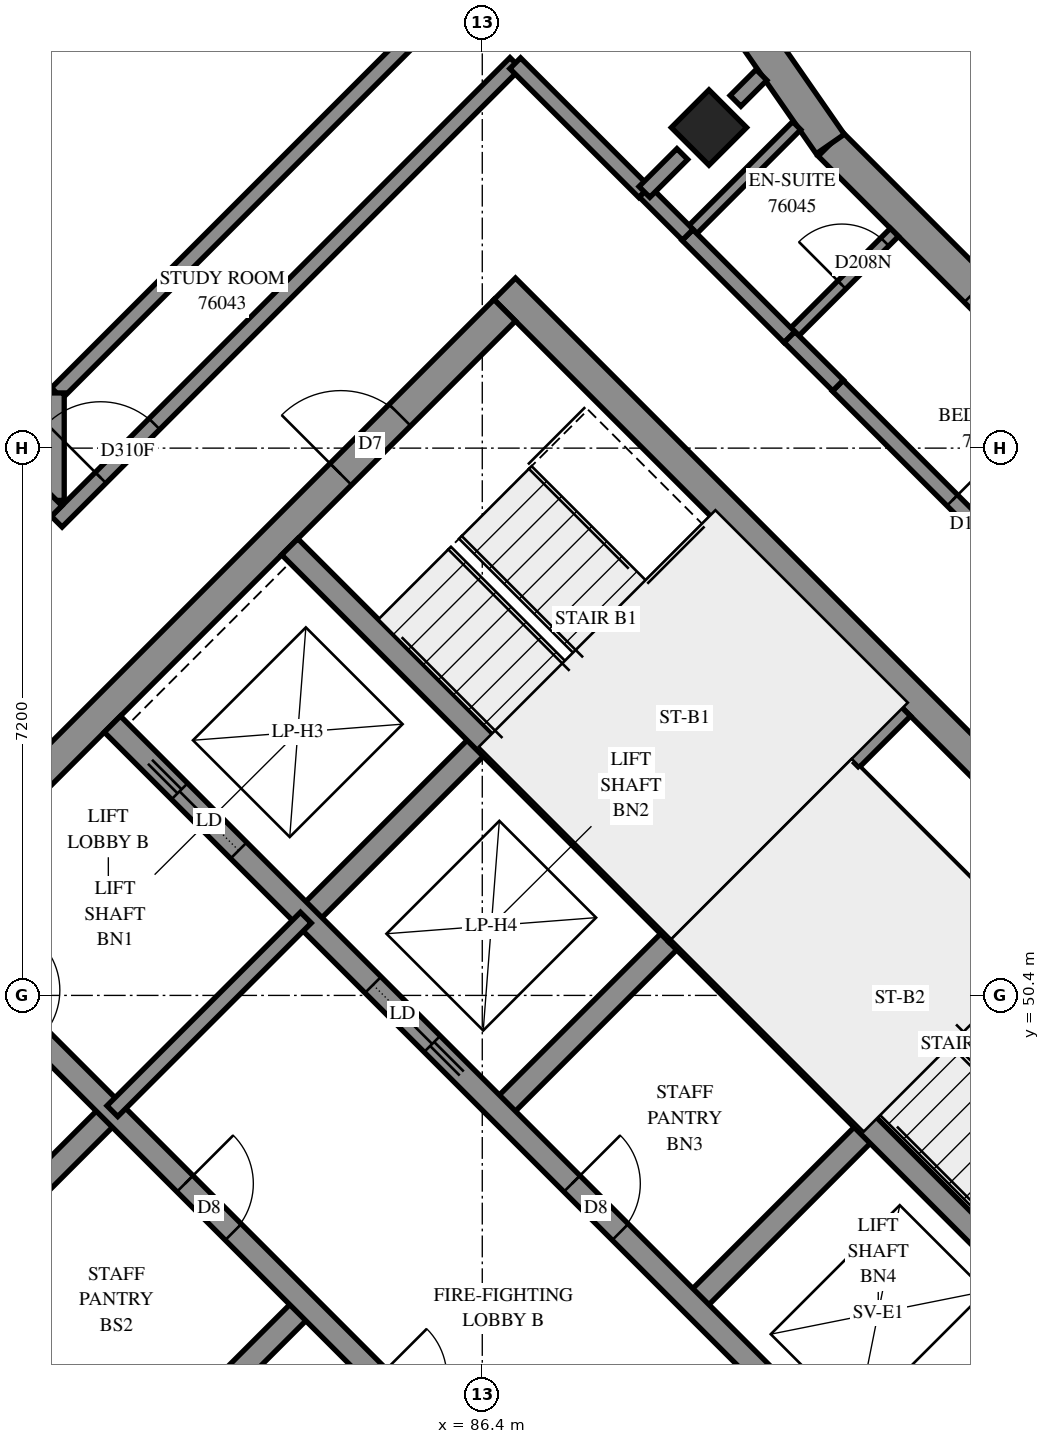
"""IFC4 building model, lengths in metres.
Left out: names, types, materials, properties, quantities, classifications, styles, units other than length and angle.
Written with IfcOpenShell. Run it as: python <this file> out.ifc"""

import sys

from ifc_helpers import new_model, si_unit, direction, frame, frame_2d, origin, origin_2d, place, context, subcontext, project, spatial, polyline, rectangle, outline, extrude, element, fill, save


model = new_model("IFC4")
c1 = context("Model", 3, precision=1e-05, world=origin(), true_north=direction((0.0, 1.0)))
c2 = subcontext(c1, "Body", "Model", "MODEL_VIEW")
j1 = project(units=[si_unit("LENGTHUNIT", "METRE"), si_unit("PLANEANGLEUNIT", "RADIAN")], contexts=[c1])
p1 = place(None, origin())
s1 = spatial("IfcSite", under=j1, at=p1, CompositionType="ELEMENT")
p2 = place(p1, origin())
s2 = spatial("IfcBuilding", under=s1, at=p2, CompositionType="ELEMENT")
p3 = place(p2, frame((0.0, 0.0, 277.8)))
s3 = spatial("IfcBuildingStorey", under=s2, at=p3, CompositionType="ELEMENT", Elevation=277.8)
p4 = place(p3, frame((89.382, 61.818, 0.0), z_axis=(0.0, 0.0, 1.0), x_axis=(0.7071067812, -0.7071067812, 0.0)))
e1 = element("IfcColumn", 1, at=p4, inside=s3, PredefinedType="COLUMN", context=c2, shape_type="SweptSolid", body=[
    extrude(rectangle(XDim=0.7, YDim=0.7, at=origin_2d()), origin(), (0.0, 0.0, 1.0), 3.1),
])
p5 = place(p3, frame((76.23, 49.231, -0.3), z_axis=(0.0, 0.0, 1.0), x_axis=(0.7071034917, -0.7071100706, 0.0)))
e2 = element("IfcWall", 2, at=p5, inside=s3, PredefinedType="SHEAR", context=c2, shape_type="SweptSolid", body=[
    extrude(rectangle(XDim=15.2, YDim=0.4, at=frame_2d((7.6, 0.0))), origin(), (0.0, 0.0, 1.0), 2.7),
])
p6 = place(p3, frame((86.695, 59.696, -0.3), z_axis=(0.0, 0.0, 1.0), x_axis=(0.7071100706, -0.7071034917, 0.0)))
e3 = element("IfcWall", 3, at=p6, inside=s3, PredefinedType="SHEAR", context=c2, shape_type="SweptSolid", body=[
    extrude(rectangle(XDim=15.2, YDim=0.4, at=frame_2d((7.6, 0.0))), origin(), (0.0, 0.0, 1.0), 2.7),
])
p7 = place(p6, frame((10.4, 0.0, 0.3)))
e4 = element("IfcOpeningElement", 4, at=p7, cuts=e3, PredefinedType="OPENING", context=c2, shape_type="SweptSolid", body=[
    extrude(rectangle(XDim=0.8, YDim=2.1, at=frame_2d((0.4, 1.05))), frame((0.0, 0.21, 0.0), z_axis=(0.0, -1.0, 0.0), x_axis=(1.0, 0.0, 0.0)), (0.0, 0.0, 1.0), 0.42),
])
p8 = place(p3, frame((76.513, 49.231, -0.3), z_axis=(0.0, 0.0, 1.0), x_axis=(0.7071067812, 0.7071067812, 0.0)))
e5 = element("IfcWall", 5, at=p8, inside=s3, PredefinedType="SHEAR", context=c2, shape_type="SweptSolid", body=[
    extrude(rectangle(XDim=14.4, YDim=0.4, at=frame_2d((7.2, 0.0))), origin(), (0.0, 0.0, 1.0), 2.7),
])
p9 = place(p8, frame((4.55, 0.0, 0.3)))
e6 = element("IfcOpeningElement", 6, at=p9, cuts=e5, PredefinedType="OPENING", context=c2, shape_type="SweptSolid", body=[
    extrude(rectangle(XDim=1.1, YDim=2.1, at=frame_2d((0.55, 1.05))), frame((0.0, 0.21, 0.0), z_axis=(0.0, -1.0, 0.0), x_axis=(1.0, 0.0, 0.0)), (0.0, 0.0, 1.0), 0.42),
])
p10 = place(p8, frame((11.35, 0.0, 0.3)))
e7 = element("IfcOpeningElement", 7, at=p10, cuts=e5, PredefinedType="OPENING", context=c2, shape_type="SweptSolid", body=[
    extrude(rectangle(XDim=1.1, YDim=2.1, at=frame_2d((0.55, 1.05))), frame((0.0, 0.21, 0.0), z_axis=(0.0, -1.0, 0.0), x_axis=(1.0, 0.0, 0.0)), (0.0, 0.0, 1.0), 0.42),
])
p11 = place(p3, frame((86.978, 38.766, -0.3), z_axis=(0.0, 0.0, 1.0), x_axis=(0.7071067812, 0.7071067812, 0.0)))
e8 = element("IfcWall", 8, at=p11, inside=s3, PredefinedType="SHEAR", context=c2, shape_type="SweptSolid", body=[
    extrude(rectangle(XDim=14.4, YDim=0.4, at=frame_2d((7.2, 0.0))), origin(), (0.0, 0.0, 1.0), 2.7),
])
p12 = place(p11, frame((4.55, 0.0, 0.3)))
e9 = element("IfcOpeningElement", 9, at=p12, cuts=e8, PredefinedType="OPENING", context=c2, shape_type="SweptSolid", body=[
    extrude(rectangle(XDim=1.1, YDim=2.1, at=frame_2d((0.55, 1.05))), frame((0.0, 0.21, 0.0), z_axis=(0.0, -1.0, 0.0), x_axis=(1.0, 0.0, 0.0)), (0.0, 0.0, 1.0), 0.42),
])
p13 = place(p11, frame((11.35, 0.0, 0.3)))
e10 = element("IfcOpeningElement", 10, at=p13, cuts=e8, PredefinedType="OPENING", context=c2, shape_type="SweptSolid", body=[
    extrude(rectangle(XDim=1.1, YDim=2.1, at=frame_2d((0.55, 1.05))), frame((0.0, 0.21, 0.0), z_axis=(0.0, -1.0, 0.0), x_axis=(1.0, 0.0, 0.0)), (0.0, 0.0, 1.0), 0.42),
])
for number, where, z_axis, x_axis in (
    (11, (79.2, 46.544, 0.0), (0.0, 0.0, 1.0), (0.707, 0.707, 0.0)),
    (12, (84.079, 51.423, 0.0), (0.0, 0.0, 1.0), (0.707, 0.707, 0.0)),
):
    element("IfcWall", number, at=place(p3, frame(where, z_axis=z_axis, x_axis=x_axis)), inside=s3, PredefinedType="SOLIDWALL", context=c2, shape_type="SweptSolid", body=[
        extrude(rectangle(XDim=3.3, YDim=0.3, at=frame_2d((1.65, 0.0))), origin(), (0.0, 0.0, 1.0), 3.1),
    ])
p14 = place(p3, frame((81.746, 43.999, 0.0), z_axis=(0.0, 0.0, 1.0), x_axis=(0.7071067812, 0.7071067812, 0.0)))
e13 = element("IfcWall", 13, at=p14, inside=s3, PredefinedType="SOLIDWALL", context=c2, shape_type="SweptSolid", body=[
    extrude(rectangle(XDim=3.3, YDim=0.3, at=frame_2d((1.65, 0.0))), origin(), (0.0, 0.0, 1.0), 3.1),
])
for number, where, z_axis, x_axis in (
    (14, (86.625, 48.878, 0.0), (0.0, 0.0, 1.0), (0.707, 0.707, 0.0)),
    (15, (89.17, 46.332, 0.0), (0.0, 0.0, 1.0), (0.707, 0.707, 0.0)),
):
    element("IfcWall", number, at=place(p3, frame(where, z_axis=z_axis, x_axis=x_axis)), inside=s3, PredefinedType="SOLIDWALL", context=c2, shape_type="SweptSolid", body=[
        extrude(rectangle(XDim=3.3, YDim=0.3, at=frame_2d((1.65, 0.0))), origin(), (0.0, 0.0, 1.0), 3.1),
    ])
p15 = place(p3, frame((78.988, 51.423, 0.0), z_axis=(0.0, 0.0, 1.0), x_axis=(0.7071067812, -0.7071067812, 0.0)))
e16 = element("IfcWall", 16, at=p15, inside=s3, PredefinedType="SOLIDWALL", context=c2, shape_type="SweptSolid", body=[
    extrude(rectangle(XDim=14.4, YDim=0.3, at=frame_2d((7.2, 0.0))), origin(), (0.0, 0.0, 1.0), 3.1),
])
p16 = place(p15, frame((1.35, 0.0, 0.0)))
e17 = element("IfcOpeningElement", 17, at=p16, cuts=e16, PredefinedType="OPENING", context=c2, shape_type="SweptSolid", body=[
    extrude(rectangle(XDim=0.9, YDim=2.1, at=frame_2d((0.45, 1.05))), frame((0.0, 0.16, 0.0), z_axis=(0.0, -1.0, 0.0), x_axis=(1.0, 0.0, 0.0)), (0.0, 0.0, 1.0), 0.32),
])
p17 = place(p15, frame((4.95, 0.0, 0.0)))
e18 = element("IfcOpeningElement", 18, at=p17, cuts=e16, PredefinedType="OPENING", context=c2, shape_type="SweptSolid", body=[
    extrude(rectangle(XDim=0.9, YDim=2.1, at=frame_2d((0.45, 1.05))), frame((0.0, 0.16, 0.0), z_axis=(0.0, -1.0, 0.0), x_axis=(1.0, 0.0, 0.0)), (0.0, 0.0, 1.0), 0.32),
])
p18 = place(p15, frame((8.55, 0.0, 0.0)))
e19 = element("IfcOpeningElement", 19, at=p18, cuts=e16, PredefinedType="OPENING", context=c2, shape_type="SweptSolid", body=[
    extrude(rectangle(XDim=0.9, YDim=2.1, at=frame_2d((0.45, 1.05))), frame((0.0, 0.16, 0.0), z_axis=(0.0, -1.0, 0.0), x_axis=(1.0, 0.0, 0.0)), (0.0, 0.0, 1.0), 0.32),
])
p19 = place(p15, frame((12.05, 0.0, 0.0)))
e20 = element("IfcOpeningElement", 20, at=p19, cuts=e16, PredefinedType="OPENING", context=c2, shape_type="SweptSolid", body=[
    extrude(rectangle(XDim=1.1, YDim=2.1, at=frame_2d((0.55, 1.05))), frame((0.0, 0.16, 0.0), z_axis=(0.0, -1.0, 0.0), x_axis=(1.0, 0.0, 0.0)), (0.0, 0.0, 1.0), 0.32),
])
p20 = place(p3, frame((81.534, 53.969, 0.0), z_axis=(0.0, 0.0, 1.0), x_axis=(0.707103309, -0.7071102534, 0.0)))
e21 = element("IfcWall", 21, at=p20, inside=s3, PredefinedType="SOLIDWALL", context=c2, shape_type="SweptSolid", body=[
    extrude(rectangle(XDim=14.4, YDim=0.3, at=frame_2d((7.2, 0.0))), origin(), (0.0, 0.0, 1.0), 3.1),
])
p21 = place(p20, frame((8.55, 0.0, 0.0)))
e22 = element("IfcOpeningElement", 22, at=p21, cuts=e21, PredefinedType="OPENING", context=c2, shape_type="SweptSolid", body=[
    extrude(rectangle(XDim=0.9, YDim=2.1, at=frame_2d((0.45, 1.05))), frame((0.0, 0.16, 0.0), z_axis=(0.0, -1.0, 0.0), x_axis=(1.0, 0.0, 0.0)), (0.0, 0.0, 1.0), 0.32),
])
p22 = place(p20, frame((1.25, 0.0, 0.0)))
e23 = element("IfcOpeningElement", 23, at=p22, cuts=e21, PredefinedType="OPENING", context=c2, shape_type="SweptSolid", body=[
    extrude(rectangle(XDim=1.1, YDim=2.1, at=frame_2d((0.55, 1.05))), frame((0.0, 0.16, 0.0), z_axis=(0.0, -1.0, 0.0), x_axis=(1.0, 0.0, 0.0)), (0.0, 0.0, 1.0), 0.32),
])
p23 = place(p20, frame((4.85, 0.0, 0.0)))
e24 = element("IfcOpeningElement", 24, at=p23, cuts=e21, PredefinedType="OPENING", context=c2, shape_type="SweptSolid", body=[
    extrude(rectangle(XDim=1.1, YDim=2.1, at=frame_2d((0.55, 1.05))), frame((0.0, 0.16, 0.0), z_axis=(0.0, -1.0, 0.0), x_axis=(1.0, 0.0, 0.0)), (0.0, 0.0, 1.0), 0.32),
])
p24 = place(p20, frame((12.05, 0.0, 0.0)))
e25 = element("IfcOpeningElement", 25, at=p24, cuts=e21, PredefinedType="OPENING", context=c2, shape_type="SweptSolid", body=[
    extrude(rectangle(XDim=1.1, YDim=2.1, at=frame_2d((0.55, 1.05))), frame((0.0, 0.16, 0.0), z_axis=(0.0, -1.0, 0.0), x_axis=(1.0, 0.0, 0.0)), (0.0, 0.0, 1.0), 0.32),
])
for number, where, z_axis, x_axis in (
    (26, (83.867, 56.302, 0.0), (0.0, 0.0, 1.0), (0.707, -0.707, 0.0)),
    (27, (88.958, 51.211, 0.0), (0.0, 0.0, 1.0), (0.707, -0.707, 0.0)),
):
    element("IfcWall", number, at=place(p3, frame(where, z_axis=z_axis, x_axis=x_axis)), inside=s3, PredefinedType="SOLIDWALL", context=c2, shape_type="SweptSolid", body=[
        extrude(rectangle(XDim=7.2, YDim=0.3, at=frame_2d((3.6, 0.0))), origin(), (0.0, 0.0, 1.0), 3.1),
    ])
p25 = place(p3, frame((88.958, 51.211, 0.0), z_axis=(0.0, 0.0, 1.0), x_axis=(0.7071067812, 0.7071067812, 0.0)))
e28 = element("IfcWall", 28, at=p25, inside=s3, PredefinedType="SOLIDWALL", context=c2, shape_type="SweptSolid", body=[
    extrude(rectangle(XDim=4.2, YDim=0.3, at=frame_2d((2.1, 0.0))), origin(), (0.0, 0.0, 1.0), 3.1),
])
p26 = place(p3, frame((95.716, 56.863, 0.0), z_axis=(0.0, 0.0, 1.0), x_axis=(-0.7071067812, 0.7071067812, 0.0)))
e29 = element("IfcWall", 29, at=p26, inside=s3, PredefinedType="SOLIDWALL", context=c2, shape_type="SweptSolid", body=[
    extrude(outline(polyline([(0.0, -0.225), (6.679, -0.225), (6.719, 0.225), (0.0, 0.225), (0.0, -0.225)])), origin(), (0.0, 0.0, 1.0), 3.1),
])
p27 = place(p26, frame((1.181, 0.0, 0.45)))
e30 = element("IfcOpeningElement", 30, at=p27, cuts=e29, PredefinedType="OPENING", context=c2, shape_type="SweptSolid", body=[
    extrude(rectangle(XDim=2.8, YDim=2.55, at=frame_2d((1.4, 1.275))), frame((0.0, 0.235, 0.0), z_axis=(0.0, -1.0, 0.0), x_axis=(1.0, 0.0, 0.0)), (0.0, 0.0, 1.0), 0.47),
])
p28 = place(p3, frame((90.978, 61.6, 0.0), z_axis=(0.0, 0.0, 1.0), x_axis=(-0.5702085576, 0.82149997, 0.0)))
e31 = element("IfcWall", 31, at=p28, inside=s3, PredefinedType="SOLIDWALL", context=c2, shape_type="SweptSolid", body=[
    extrude(outline(polyline([(0.02, -0.225), (3.414, -0.225), (3.332, 0.225), (-0.02, 0.225), (0.02, -0.225)])), origin(), (0.0, 0.0, 1.0), 3.1),
])
p29 = place(p28, frame((1.618, 0.0, 0.45)))
e32 = element("IfcOpeningElement", 32, at=p29, cuts=e31, PredefinedType="OPENING", context=c2, shape_type="SweptSolid", body=[
    extrude(rectangle(XDim=1.2, YDim=2.55, at=frame_2d((0.6, 1.275))), frame((0.0, 0.235, 0.0), z_axis=(0.0, -1.0, 0.0), x_axis=(1.0, 0.0, 0.0)), (0.0, 0.0, 1.0), 0.47),
])
p30 = place(p3, frame((91.313, 53.354, 0.0), z_axis=(0.0, 0.0, 1.0), x_axis=(0.7071067812, -0.7071067812, 0.0)))
e33 = element("IfcWall", 33, at=p30, inside=s3, PredefinedType="PARTITIONING", context=c2, shape_type="SweptSolid", body=[
    extrude(rectangle(XDim=5.65, YDim=0.15, at=frame_2d((2.825, 0.0))), origin(), (0.0, 0.0, 1.0), 3.1),
])
p31 = place(p3, frame((81.534, 48.878, 0.0), z_axis=(0.0, 0.0, 1.0), x_axis=(0.707092892, 0.7071206701, 0.0)))
e34 = element("IfcWall", 34, at=p31, inside=s3, PredefinedType="PARTITIONING", context=c2, shape_type="SweptSolid", body=[
    extrude(rectangle(XDim=3.6, YDim=0.2, at=frame_2d((1.8, 0.0))), origin(), (0.0, 0.0, 1.0), 3.1),
])
p32 = place(p3, frame((80.803, 58.323, 0.0), z_axis=(0.0, 0.0, 1.0), x_axis=(0.7070026249, 0.7072109222, 0.0)))
e35 = element("IfcWall", 35, at=p32, inside=s3, PredefinedType="PARTITIONING", context=c2, shape_type="SweptSolid", body=[
    extrude(rectangle(XDim=9.602, YDim=0.2, at=frame_2d((4.801, 0.0))), origin(), (0.0, 0.0, 1.0), 3.1),
])
p33 = place(p3, frame((80.802, 56.633, 0.0), z_axis=(0.0, 0.0, 1.0), x_axis=(0.7071067812, 0.7071067812, 0.0)))
e36 = element("IfcWall", 36, at=p33, inside=s3, PredefinedType="PARTITIONING", context=c2, shape_type="SweptSolid", body=[
    extrude(rectangle(XDim=8.533, YDim=0.2, at=frame_2d((4.267, 0.0))), origin(), (0.0, 0.0, 1.0), 3.1),
])
p34 = place(p33, frame((0.817, 0.0, 0.0)))
e37 = element("IfcOpeningElement", 37, at=p34, cuts=e36, PredefinedType="OPENING", context=c2, shape_type="SweptSolid", body=[
    extrude(rectangle(XDim=1.0, YDim=2.1, at=frame_2d((0.5, 1.05))), frame((0.0, 0.11, 0.0), z_axis=(0.0, -1.0, 0.0), x_axis=(1.0, 0.0, 0.0)), (0.0, 0.0, 1.0), 0.22),
])
p35 = place(p3, frame((91.077, 58.421, 0.0), z_axis=(0.0, 0.0, 1.0), x_axis=(0.7069703926, -0.7072431435, 0.0)))
e38 = element("IfcWall", 38, at=p35, inside=s3, PredefinedType="PARTITIONING", context=c2, shape_type="SweptSolid", body=[
    extrude(rectangle(XDim=4.4, YDim=0.2, at=frame_2d((2.2, 0.0))), origin(), (0.0, 0.0, 1.0), 3.1),
])
p36 = place(p35, frame((2.132, 0.0, 0.0)))
e39 = element("IfcOpeningElement", 39, at=p36, cuts=e38, PredefinedType="OPENING", context=c2, shape_type="SweptSolid", body=[
    extrude(rectangle(XDim=0.9, YDim=2.1, at=frame_2d((0.45, 1.05))), frame((0.0, 0.11, 0.0), z_axis=(0.0, -1.0, 0.0), x_axis=(1.0, 0.0, 0.0)), (0.0, 0.0, 1.0), 0.22),
])
p37 = place(p3, frame((86.833, 62.663, 0.0), z_axis=(0.0, 0.0, 1.0), x_axis=(0.7075233388, -0.706689978, 0.0)))
e40 = element("IfcWall", 40, at=p37, inside=s3, PredefinedType="PARTITIONING", context=c2, shape_type="SweptSolid", body=[
    extrude(rectangle(XDim=2.4, YDim=0.2, at=frame_2d((1.2, 0.0))), origin(), (0.0, 0.0, 1.0), 3.1),
])
p38 = place(p3, frame((89.099, 60.405, 0.0), z_axis=(0.0, 0.0, 1.0), x_axis=(0.7071067812, 0.7071067812, 0.0)))
e41 = element("IfcWall", 41, at=p38, inside=s3, PredefinedType="PARTITIONING", context=c2, shape_type="SweptSolid", body=[
    extrude(rectangle(XDim=2.033, YDim=0.15, at=frame_2d((1.016, 0.0))), origin(), (0.0, 0.0, 1.0), 3.1),
])
p39 = place(p3, frame((90.442, 59.06, 0.0), z_axis=(0.0, 0.0, 1.0), x_axis=(0.7076448457, 0.7065683069, 0.0)))
e42 = element("IfcWall", 42, at=p39, inside=s3, PredefinedType="PARTITIONING", context=c2, shape_type="SweptSolid", body=[
    extrude(rectangle(XDim=1.951, YDim=0.15, at=frame_2d((0.975, 0.0))), origin(), (0.0, 0.0, 1.0), 3.1),
])
p40 = place(p39, frame((0.973, 0.0, 0.0)))
e43 = element("IfcOpeningElement", 43, at=p40, cuts=e42, PredefinedType="OPENING", context=c2, shape_type="SweptSolid", body=[
    extrude(rectangle(XDim=0.8, YDim=2.1, at=frame_2d((0.4, 1.05))), frame((0.0, 0.085, 0.0), z_axis=(0.0, -1.0, 0.0), x_axis=(1.0, 0.0, 0.0)), (0.0, 0.0, 1.0), 0.17),
])
p41 = place(p3, frame((89.1, 60.404, 0.0), z_axis=(0.0, 0.0, 1.0), x_axis=(0.7065800724, -0.7076330979, 0.0)))
e44 = element("IfcWall", 44, at=p41, inside=s3, PredefinedType="PARTITIONING", context=c2, shape_type="SweptSolid", body=[
    extrude(rectangle(XDim=1.899, YDim=0.2, at=frame_2d((0.95, 0.0))), origin(), (0.0, 0.0, 1.0), 3.1),
])
p42 = place(p3, frame((80.8, 56.912, 0.0), z_axis=(0.0, 0.0, 1.0), x_axis=(0.0, 1.0, 0.0)))
e45 = element("IfcWall", 45, at=p42, inside=s3, PredefinedType="PARTITIONING", context=c2, shape_type="SweptSolid", body=[
    extrude(rectangle(XDim=1.414, YDim=0.2, at=frame_2d((0.707, 0.0))), origin(), (0.0, 0.0, 1.0), 3.1),
])
p43 = place(p3, frame((79.801, 55.915, 0.0), z_axis=(0.0, 0.0, 1.0), x_axis=(0.7071067812, 0.7071067812, 0.0)))
e46 = element("IfcWall", 46, at=p43, inside=s3, PredefinedType="PARTITIONING", context=c2, shape_type="SweptSolid", body=[
    extrude(rectangle(XDim=1.411, YDim=0.2, at=frame_2d((0.706, 0.0))), origin(), (0.0, 0.0, 1.0), 3.1),
])
p44 = place(p3, frame((90.443, 59.061, 0.0), z_axis=(0.0, 0.0, 1.0), x_axis=(0.7082159662, -0.7059958535, 0.0)))
e47 = element("IfcWall", 47, at=p44, inside=s3, PredefinedType="PARTITIONING", context=c2, shape_type="SweptSolid", body=[
    extrude(rectangle(XDim=0.901, YDim=0.2, at=frame_2d((0.451, 0.0))), origin(), (0.0, 0.0, 1.0), 3.1),
])
p45 = place(p3, frame((88.537, 60.973, 0.0), z_axis=(0.0, 0.0, 1.0), x_axis=(0.7071067812, -0.7071067812, 0.0)))
e48 = element("IfcWall", 48, at=p45, inside=s3, PredefinedType="PARTITIONING", context=c2, shape_type="SweptSolid", body=[
    extrude(rectangle(XDim=0.8, YDim=0.2, at=frame_2d((0.4, 0.0))), origin(), (0.0, 0.0, 1.0), 3.1),
])
p46 = place(p3, frame((88.534, 60.971, 0.0), z_axis=(0.0, 0.0, 1.0), x_axis=(0.7071067812, 0.7071067812, 0.0)))
e49 = element("IfcWall", 49, at=p46, inside=s3, PredefinedType="PARTITIONING", context=c2, shape_type="SweptSolid", body=[
    extrude(rectangle(XDim=0.704, YDim=0.2, at=frame_2d((0.352, 0.0))), origin(), (0.0, 0.0, 1.0), 3.1),
])
p47 = place(p3, frame((89.731, 62.169, 0.0), z_axis=(0.0, 0.0, 1.0), x_axis=(0.7071067812, 0.7071067812, 0.0)))
e50 = element("IfcWall", 50, at=p47, inside=s3, PredefinedType="PARTITIONING", context=c2, shape_type="SweptSolid", body=[
    extrude(rectangle(XDim=0.483, YDim=0.2, at=frame_2d((0.241, 0.0))), origin(), (0.0, 0.0, 1.0), 3.1),
])
p48 = place(p27, origin())
e51 = element("IfcWindow", 51, at=p48, inside=s3, PartitioningType="SINGLE_PANEL", PredefinedType="WINDOW", context=c2, shape_type="SweptSolid", body=[
    extrude(rectangle(XDim=2.8, YDim=2.55, at=frame_2d((1.4, 1.275))), frame((0.0, 0.205, 0.0), z_axis=(0.0, -1.0, 0.0), x_axis=(1.0, 0.0, 0.0)), (0.0, 0.0, 1.0), 0.06),
])
fill(e30, e51)
p49 = place(p10, origin())
e52 = element("IfcDoor", 52, at=p49, inside=s3, OperationType="SINGLE_SWING_LEFT", PredefinedType="DOOR", context=c2, shape_type="SweptSolid", body=[
    extrude(rectangle(XDim=1.1, YDim=2.1, at=frame_2d((0.55, 1.05))), frame((0.0, 0.025, 0.0), z_axis=(0.0, -1.0, 0.0), x_axis=(1.0, 0.0, 0.0)), (0.0, 0.0, 1.0), 0.05),
])
fill(e7, e52)
p50 = place(p17, origin())
e53 = element("IfcDoor", 53, at=p50, inside=s3, OperationType="SINGLE_SWING_LEFT", PredefinedType="DOOR", context=c2, shape_type="SweptSolid", body=[
    extrude(rectangle(XDim=0.9, YDim=2.1, at=frame_2d((0.45, 1.05))), frame((0.0, 0.025, 0.0), z_axis=(0.0, -1.0, 0.0), x_axis=(1.0, 0.0, 0.0)), (0.0, 0.0, 1.0), 0.05),
])
fill(e18, e53)
p51 = place(p21, origin())
e54 = element("IfcDoor", 54, at=p51, inside=s3, OperationType="SINGLE_SWING_LEFT", PredefinedType="DOOR", context=c2, shape_type="SweptSolid", body=[
    extrude(rectangle(XDim=0.9, YDim=2.1, at=frame_2d((0.45, 1.05))), frame((0.0, 0.025, 0.0), z_axis=(0.0, -1.0, 0.0), x_axis=(1.0, 0.0, 0.0)), (0.0, 0.0, 1.0), 0.05),
])
fill(e22, e54)
p52 = place(p22, origin())
e55 = element("IfcDoor", 55, at=p52, inside=s3, OperationType="SLIDING_TO_LEFT", PredefinedType="DOOR", context=c2, shape_type="SweptSolid", body=[
    extrude(rectangle(XDim=1.1, YDim=2.1, at=frame_2d((0.55, 1.05))), frame((0.0, 0.025, 0.0), z_axis=(0.0, -1.0, 0.0), x_axis=(1.0, 0.0, 0.0)), (0.0, 0.0, 1.0), 0.05),
])
fill(e23, e55)
p53 = place(p23, origin())
e56 = element("IfcDoor", 56, at=p53, inside=s3, OperationType="SLIDING_TO_RIGHT", PredefinedType="DOOR", context=c2, shape_type="SweptSolid", body=[
    extrude(rectangle(XDim=1.1, YDim=2.1, at=frame_2d((0.55, 1.05))), frame((0.0, 0.025, 0.0), z_axis=(0.0, -1.0, 0.0), x_axis=(1.0, 0.0, 0.0)), (0.0, 0.0, 1.0), 0.05),
])
fill(e24, e56)
p54 = place(p34, origin())
e57 = element("IfcDoor", 57, at=p54, inside=s3, OperationType="SINGLE_SWING_RIGHT", PredefinedType="DOOR", context=c2, shape_type="SweptSolid", body=[
    extrude(rectangle(XDim=1.0, YDim=2.1, at=frame_2d((0.5, 1.05))), frame((0.0, 0.025, 0.0), z_axis=(0.0, -1.0, 0.0), x_axis=(1.0, 0.0, 0.0)), (0.0, 0.0, 1.0), 0.05),
])
fill(e37, e57)
p55 = place(p36, origin())
e58 = element("IfcDoor", 58, at=p55, inside=s3, OperationType="SINGLE_SWING_LEFT", PredefinedType="DOOR", context=c2, shape_type="SweptSolid", body=[
    extrude(rectangle(XDim=0.9, YDim=2.1, at=frame_2d((0.45, 1.05))), frame((0.0, 0.025, 0.0), z_axis=(0.0, -1.0, 0.0), x_axis=(1.0, 0.0, 0.0)), (0.0, 0.0, 1.0), 0.05),
])
fill(e39, e58)
p56 = place(p40, origin())
e59 = element("IfcDoor", 59, at=p56, inside=s3, OperationType="SINGLE_SWING_RIGHT", PredefinedType="DOOR", context=c2, shape_type="SweptSolid", body=[
    extrude(rectangle(XDim=0.8, YDim=2.1, at=frame_2d((0.4, 1.05))), frame((0.0, 0.025, 0.0), z_axis=(0.0, -1.0, 0.0), x_axis=(1.0, 0.0, 0.0)), (0.0, 0.0, 1.0), 0.05),
])
fill(e43, e59)
save(model, sys.argv[1])
